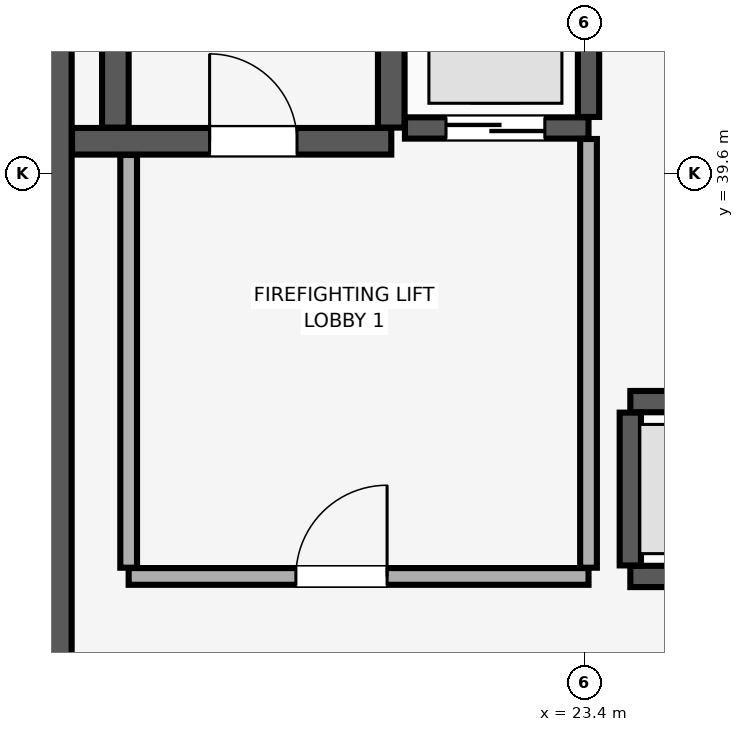
"""IFC4 building model, lengths in metres.
Left out: names, types, materials, properties, quantities, classifications, styles, units other than length and angle.
Written with IfcOpenShell. Run it as: python <this file> out.ifc"""

import sys

from ifc_helpers import new_model, si_unit, direction, frame, frame_2d, origin, place, context, subcontext, project, spatial, rectangle, extrude, element, fill, save


model = new_model("IFC4")
c1 = context("Model", 3, precision=1e-05, world=origin(), true_north=direction((0.0, 1.0)))
c2 = subcontext(c1, "Body", "Model", "MODEL_VIEW")
j1 = project(units=[si_unit("LENGTHUNIT", "METRE"), si_unit("PLANEANGLEUNIT", "RADIAN")], contexts=[c1])
p1 = place(None, origin())
s1 = spatial("IfcSite", under=j1, at=p1, CompositionType="ELEMENT")
p2 = place(p1, origin())
s2 = spatial("IfcBuilding", under=s1, at=p2, CompositionType="ELEMENT")
p3 = place(p2, frame((0.0, 0.0, 130.55)))
s3 = spatial("IfcBuildingStorey", under=s2, at=p3, CompositionType="ELEMENT", Elevation=130.55)
p4 = place(p3, frame((16.2, 29.4, 0.0), z_axis=(0.0, 0.0, 1.0), x_axis=(0.0, 1.0, 0.0)))
e1 = element("IfcWall", 1, at=p4, inside=s3, PredefinedType="SHEAR", context=c2, shape_type="SweptSolid", body=[
    extrude(rectangle(XDim=19.2, YDim=0.9, at=frame_2d((9.6, 0.0))), origin(), (0.0, 0.0, 1.0), 4.52),
])
p5 = place(p3, frame((16.655, 40.025, 0.0), z_axis=(0.0, 0.0, 1.0), x_axis=(1.0, 0.0, 0.0)))
e2 = element("IfcWall", 2, at=p5, inside=s3, PredefinedType="SHEAR", context=c2, shape_type="SweptSolid", body=[
    extrude(rectangle(XDim=4.2, YDim=0.35, at=frame_2d((2.1, 0.0))), origin(), (0.0, 0.0, 1.0), 4.52),
])
p6 = place(p5, frame((1.81, 0.0, 0.0)))
e3 = element("IfcOpeningElement", 3, at=p6, cuts=e2, PredefinedType="OPENING", context=c2, shape_type="SweptSolid", body=[
    extrude(rectangle(XDim=1.15, YDim=2.15, at=frame_2d((0.575, 1.075))), frame((0.0, 0.185, 0.0), z_axis=(0.0, -1.0, 0.0), x_axis=(1.0, 0.0, 0.0)), (0.0, 0.0, 1.0), 0.37),
])
for number, where, z_axis, x_axis in (
    (4, (17.225, 40.205, 0.0), (0.0, 0.0, 1.0), (0.0, 1.0, 0.0)),
    (5, (20.855, 40.205, 0.0), (0.0, 0.0, 1.0), (0.0, 1.0, 0.0)),
):
    element("IfcWall", number, at=place(p3, frame(where, z_axis=z_axis, x_axis=x_axis)), inside=s3, PredefinedType="SHEAR", context=c2, shape_type="SweptSolid", body=[
        extrude(rectangle(XDim=8.09, YDim=0.35, at=frame_2d((4.045, 0.0))), origin(), (0.0, 0.0, 1.0), 4.52),
    ])
p7 = place(p3, frame((24.0, 34.3, 0.0), z_axis=(0.0, 0.0, 1.0), x_axis=(1.0, 0.0, 0.0)))
e6 = element("IfcWall", 6, at=p7, inside=s3, PredefinedType="SHEAR", context=c2, shape_type="SweptSolid", body=[
    extrude(rectangle(XDim=2.3, YDim=0.28, at=frame_2d((1.15, 0.0))), origin(), (0.0, 0.0, 1.0), 4.52),
])
p8 = place(p7, frame((0.6, 0.0, 0.0)))
e7 = element("IfcOpeningElement", 7, at=p8, cuts=e6, PredefinedType="OPENING", context=c2, shape_type="SweptSolid", body=[
    extrude(rectangle(XDim=1.1, YDim=2.2, at=frame_2d((0.55, 1.1))), frame((0.0, 0.15, 0.0), z_axis=(0.0, -1.0, 0.0), x_axis=(1.0, 0.0, 0.0)), (0.0, 0.0, 1.0), 0.3),
])
p9 = place(p3, frame((24.0, 36.6, 0.0), z_axis=(0.0, 0.0, 1.0), x_axis=(1.0, 0.0, 0.0)))
e8 = element("IfcWall", 8, at=p9, inside=s3, PredefinedType="SHEAR", context=c2, shape_type="SweptSolid", body=[
    extrude(rectangle(XDim=2.3, YDim=0.28, at=frame_2d((1.15, 0.0))), origin(), (0.0, 0.0, 1.0), 4.52),
])
p10 = place(p3, frame((24.0, 34.445, 0.0), z_axis=(0.0, 0.0, 1.0), x_axis=(0.0, 1.0, 0.0)))
e9 = element("IfcWall", 9, at=p10, inside=s3, PredefinedType="SHEAR", context=c2, shape_type="SweptSolid", body=[
    extrude(rectangle(XDim=2.01, YDim=0.28, at=frame_2d((1.005, 0.0))), origin(), (0.0, 0.0, 1.0), 4.52),
])
p11 = place(p3, frame((21.035, 40.2, 0.0), z_axis=(0.0, 0.0, 1.0), x_axis=(1.0, 0.0, 0.0)))
e10 = element("IfcWall", 10, at=p11, inside=s3, PredefinedType="SHEAR", context=c2, shape_type="SweptSolid", body=[
    extrude(rectangle(XDim=2.415, YDim=0.28, at=frame_2d((1.208, 0.0))), origin(), (0.0, 0.0, 1.0), 4.52),
])
p12 = place(p11, frame((0.54, 0.0, 0.0)))
e11 = element("IfcOpeningElement", 11, at=p12, cuts=e10, PredefinedType="OPENING", context=c2, shape_type="SweptSolid", body=[
    extrude(rectangle(XDim=1.3, YDim=2.3, at=frame_2d((0.65, 1.15))), frame((0.0, 0.15, 0.0), z_axis=(0.0, -1.0, 0.0), x_axis=(1.0, 0.0, 0.0)), (0.0, 0.0, 1.0), 0.3),
])
p13 = place(p3, frame((23.45, 40.345, 0.0), z_axis=(0.0, 0.0, 1.0), x_axis=(0.0, 1.0, 0.0)))
e12 = element("IfcWall", 12, at=p13, inside=s3, PredefinedType="SHEAR", context=c2, shape_type="SweptSolid", body=[
    extrude(rectangle(XDim=2.81, YDim=0.28, at=frame_2d((1.405, 0.0))), origin(), (0.0, 0.0, 1.0), 4.52),
])
p14 = place(p3, frame((17.4, 34.3, 0.0), z_axis=(0.0, 0.0, 1.0), x_axis=(1.0, 0.0, 0.0)))
e13 = element("IfcWall", 13, at=p14, inside=s3, PredefinedType="PARTITIONING", context=c2, shape_type="SweptSolid", body=[
    extrude(rectangle(XDim=6.05, YDim=0.22, at=frame_2d((3.025, 0.0))), origin(), (0.0, 0.0, 1.0), 4.52),
])
p15 = place(p14, frame((2.2, 0.0, 0.0)))
e14 = element("IfcOpeningElement", 14, at=p15, cuts=e13, PredefinedType="OPENING", context=c2, shape_type="SweptSolid", body=[
    extrude(rectangle(XDim=1.2, YDim=2.15, at=frame_2d((0.6, 1.075))), frame((0.0, 0.12, 0.0), z_axis=(0.0, -1.0, 0.0), x_axis=(1.0, 0.0, 0.0)), (0.0, 0.0, 1.0), 0.24),
])
p16 = place(p3, frame((17.4, 34.415, 0.0), z_axis=(0.0, 0.0, 1.0), x_axis=(0.0, 1.0, 0.0)))
e15 = element("IfcWall", 15, at=p16, inside=s3, PredefinedType="PARTITIONING", context=c2, shape_type="SweptSolid", body=[
    extrude(rectangle(XDim=5.43, YDim=0.22, at=frame_2d((2.715, 0.0))), origin(), (0.0, 0.0, 1.0), 4.52),
])
p17 = place(p3, frame((23.45, 34.415, 0.0), z_axis=(0.0, 0.0, 1.0), x_axis=(0.0, 1.0, 0.0)))
e16 = element("IfcWall", 16, at=p17, inside=s3, PredefinedType="PARTITIONING", context=c2, shape_type="SweptSolid", body=[
    extrude(rectangle(XDim=5.64, YDim=0.22, at=frame_2d((2.82, 0.0))), origin(), (0.0, 0.0, 1.0), 4.52),
])
p18 = place(p6, origin())
e17 = element("IfcDoor", 17, at=p18, inside=s3, OperationType="SINGLE_SWING_LEFT", PredefinedType="DOOR", context=c2, shape_type="SweptSolid", body=[
    extrude(rectangle(XDim=1.15, YDim=2.15, at=frame_2d((0.575, 1.075))), frame((0.0, 0.025, 0.0), z_axis=(0.0, -1.0, 0.0), x_axis=(1.0, 0.0, 0.0)), (0.0, 0.0, 1.0), 0.05),
])
fill(e3, e17)
p19 = place(p12, origin())
e18 = element("IfcDoor", 18, at=p19, inside=s3, OperationType="DOUBLE_DOOR_SLIDING", PredefinedType="DOOR", context=c2, shape_type="SweptSolid", body=[
    extrude(rectangle(XDim=1.3, YDim=2.3, at=frame_2d((0.65, 1.15))), frame((0.0, 0.025, 0.0), z_axis=(0.0, -1.0, 0.0), x_axis=(1.0, 0.0, 0.0)), (0.0, 0.0, 1.0), 0.05),
])
fill(e11, e18)
p20 = place(p15, origin())
e19 = element("IfcDoor", 19, at=p20, inside=s3, OperationType="SINGLE_SWING_RIGHT", PredefinedType="DOOR", context=c2, shape_type="SweptSolid", body=[
    extrude(rectangle(XDim=1.2, YDim=2.15, at=frame_2d((0.6, 1.075))), frame((0.0, 0.025, 0.0), z_axis=(0.0, -1.0, 0.0), x_axis=(1.0, 0.0, 0.0)), (0.0, 0.0, 1.0), 0.05),
])
fill(e14, e19)
save(model, sys.argv[1])
